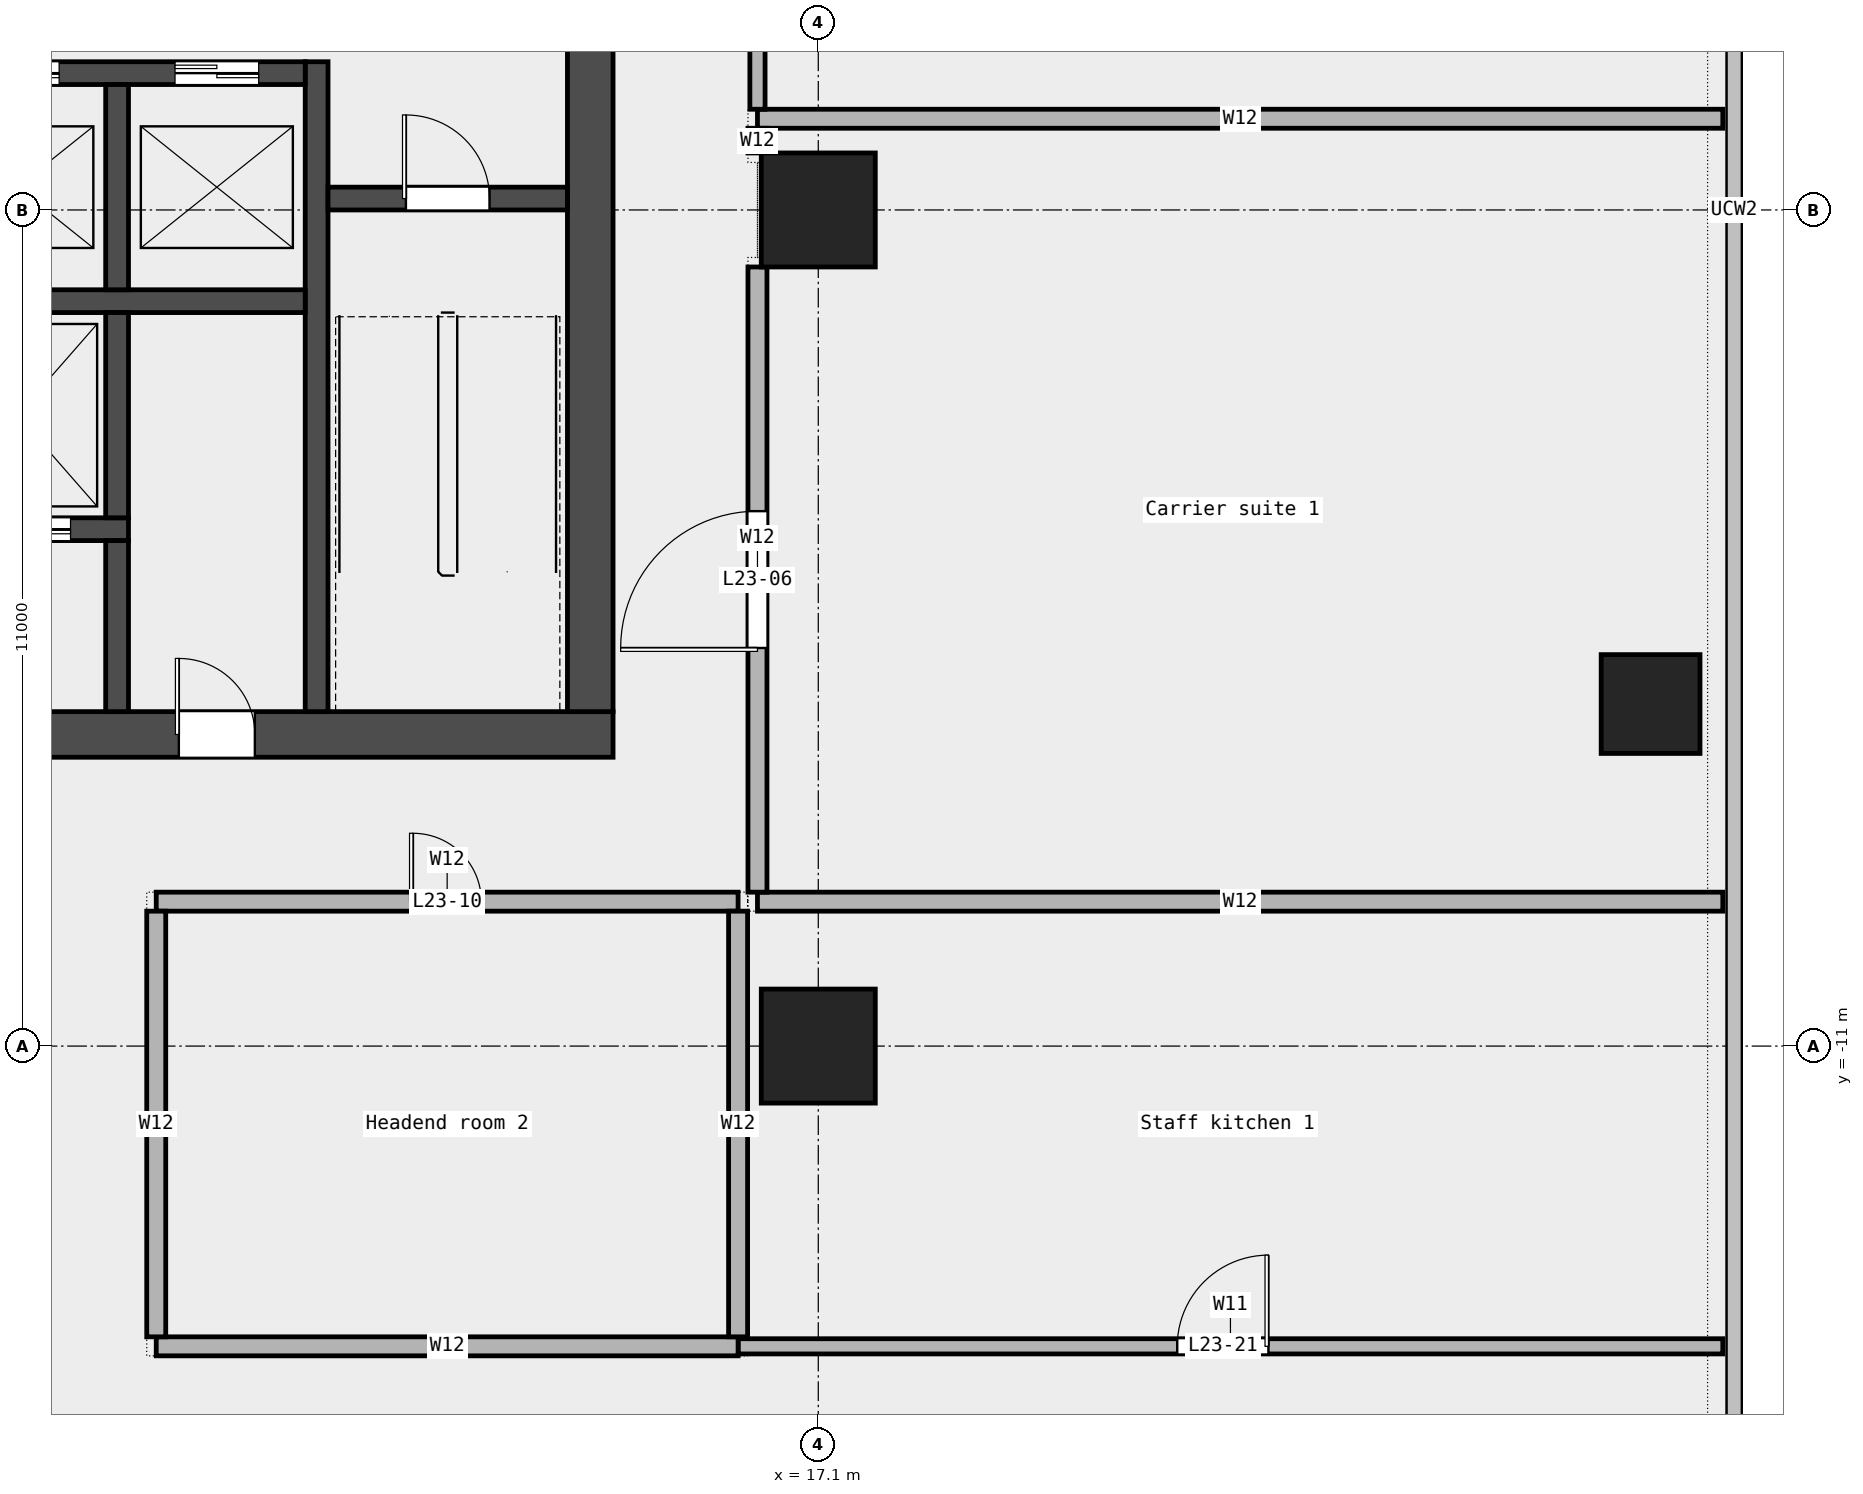
"""IFC4 building model, lengths in metres.
Left out: names, types, materials, properties, quantities, classifications, styles, units other than length and angle.
Written with IfcOpenShell. Run it as: python <this file> out.ifc"""

import sys

from ifc_helpers import new_model, si_unit, direction, frame, frame_2d, origin, origin_2d, place, context, subcontext, project, spatial, rectangle, extrude, element, fill, save


model = new_model("IFC4")
c1 = context("Model", 3, precision=1e-05, world=origin(), true_north=direction((0.0, 1.0)))
c2 = subcontext(c1, "Body", "Model", "MODEL_VIEW")
j1 = project(units=[si_unit("LENGTHUNIT", "METRE"), si_unit("PLANEANGLEUNIT", "RADIAN")], contexts=[c1])
p1 = place(None, origin())
s1 = spatial("IfcSite", under=j1, at=p1, CompositionType="ELEMENT")
p2 = place(p1, origin())
s2 = spatial("IfcBuilding", under=s1, at=p2, CompositionType="ELEMENT")
p3 = place(p2, frame((0.0, 0.0, 117.1)))
s3 = spatial("IfcBuildingStorey", under=s2, at=p3, CompositionType="ELEMENT", Elevation=117.1)
p4 = place(p3, frame((28.05, -6.5, 0.0), z_axis=(0.0, 0.0, 1.0), x_axis=(1.0, 0.0, 0.0)))
e1 = element("IfcColumn", 1, at=p4, inside=s3, PredefinedType="COLUMN", context=c2, shape_type="SweptSolid", body=[
    extrude(rectangle(XDim=1.3, YDim=1.3, at=origin_2d()), origin(), (0.0, 0.0, 1.0), 4.05),
])
for number, where, z_axis, x_axis in (
    (2, (17.1, -11.0, 0.0), (0.0, 0.0, 1.0), (1.0, 0.0, 0.0)),
    (3, (17.1, 0.0, 0.0), (0.0, 0.0, 1.0), (1.0, 0.0, 0.0)),
):
    element("IfcColumn", number, at=place(p3, frame(where, z_axis=z_axis, x_axis=x_axis)), inside=s3, PredefinedType="COLUMN", context=c2, shape_type="SweptSolid", body=[
        extrude(rectangle(XDim=1.5, YDim=1.5, at=origin_2d()), origin(), (0.0, 0.0, 1.0), 4.05),
    ])
p5 = place(p3, frame((16.045, -14.95, 0.0), z_axis=(0.0, 0.0, 1.0), x_axis=(1.0, 0.0, 0.0)))
e4 = element("IfcWall", 4, at=p5, inside=s3, PredefinedType="PARTITIONING", context=c2, shape_type="SweptSolid", body=[
    extrude(rectangle(XDim=12.955, YDim=0.2, at=frame_2d((6.478, 0.0))), origin(), (0.0, 0.0, 1.0), 4.05),
])
p6 = place(p5, frame((5.778, 0.0, 0.0)))
e5 = element("IfcOpeningElement", 5, at=p6, cuts=e4, PredefinedType="OPENING", context=c2, shape_type="SweptSolid", body=[
    extrude(rectangle(XDim=1.2, YDim=2.1, at=frame_2d((0.6, 1.05))), frame((0.0, 0.112, 0.0), z_axis=(0.0, -1.0, 0.0), x_axis=(1.0, 0.0, 0.0)), (0.0, 0.0, 1.0), 0.224),
])
p7 = place(p3, frame((8.39, -14.95, 0.0), z_axis=(0.0, 0.0, 1.0), x_axis=(1.0, 0.0, 0.0)))
e6 = element("IfcWall", 6, at=p7, inside=s3, PredefinedType="PARTITIONING", context=c2, shape_type="SweptSolid", body=[
    extrude(rectangle(XDim=7.655, YDim=0.25, at=frame_2d((3.828, 0.0))), origin(), (0.0, 0.0, 1.0), 4.05),
])
p8 = place(p3, frame((8.39, -9.1, 0.0), z_axis=(0.0, 0.0, 1.0), x_axis=(1.0, 0.0, 0.0)))
e7 = element("IfcWall", 7, at=p8, inside=s3, PredefinedType="PARTITIONING", context=c2, shape_type="SweptSolid", body=[
    extrude(rectangle(XDim=7.655, YDim=0.25, at=frame_2d((3.828, 0.0))), origin(), (0.0, 0.0, 1.0), 4.05),
])
p9 = place(p8, frame((3.377, 0.0, 0.0)))
e8 = element("IfcOpeningElement", 8, at=p9, cuts=e7, PredefinedType="OPENING", context=c2, shape_type="SweptSolid", body=[
    extrude(rectangle(XDim=0.9, YDim=2.1, at=frame_2d((0.45, 1.05))), frame((0.0, 0.137, 0.0), z_axis=(0.0, -1.0, 0.0), x_axis=(1.0, 0.0, 0.0)), (0.0, 0.0, 1.0), 0.274),
])
for number, where, z_axis, x_axis in (
    (9, (16.3, -9.1, 0.0), (0.0, 0.0, 1.0), (1.0, 0.0, 0.0)),
    (10, (16.3, 1.2, 0.0), (0.0, 0.0, 1.0), (1.0, 0.0, 0.0)),
):
    element("IfcWall", number, at=place(p3, frame(where, z_axis=z_axis, x_axis=x_axis)), inside=s3, PredefinedType="PARTITIONING", context=c2, shape_type="SweptSolid", body=[
        extrude(rectangle(XDim=12.7, YDim=0.25, at=frame_2d((6.35, 0.0))), origin(), (0.0, 0.0, 1.0), 4.05),
    ])
for number, where, z_axis, x_axis in (
    (11, (8.39, -14.825, 0.0), (0.0, 0.0, 1.0), (0.0, 1.0, 0.0)),
    (12, (16.045, -14.825, 0.0), (0.0, 0.0, 1.0), (0.0, 1.0, 0.0)),
):
    element("IfcWall", number, at=place(p3, frame(where, z_axis=z_axis, x_axis=x_axis)), inside=s3, PredefinedType="PARTITIONING", context=c2, shape_type="SweptSolid", body=[
        extrude(rectangle(XDim=5.6, YDim=0.25, at=frame_2d((2.8, 0.0))), origin(), (0.0, 0.0, 1.0), 4.05),
    ])
p10 = place(p3, frame((16.3, 1.325, 0.0), z_axis=(0.0, 0.0, 1.0), x_axis=(0.0, 1.0, 0.0)))
e13 = element("IfcWall", 13, at=p10, inside=s3, PredefinedType="PARTITIONING", context=c2, shape_type="SweptSolid", body=[
    extrude(rectangle(XDim=8.925, YDim=0.2, at=frame_2d((4.462, 0.0))), origin(), (0.0, 0.0, 1.0), 4.05),
])
p11 = place(p10, frame((3.188, 0.0, 0.0)))
e14 = element("IfcOpeningElement", 14, at=p11, cuts=e13, PredefinedType="OPENING", context=c2, shape_type="SweptSolid", body=[
    extrude(rectangle(XDim=1.8, YDim=2.1, at=frame_2d((0.9, 1.05))), frame((0.0, 0.112, 0.0), z_axis=(0.0, -1.0, 0.0), x_axis=(1.0, 0.0, 0.0)), (0.0, 0.0, 1.0), 0.224),
])
p12 = place(p3, frame((16.3, -8.975, 0.0), z_axis=(0.0, 0.0, 1.0), x_axis=(0.0, 1.0, 0.0)))
e15 = element("IfcWall", 15, at=p12, inside=s3, PredefinedType="PARTITIONING", context=c2, shape_type="SweptSolid", body=[
    extrude(rectangle(XDim=8.225, YDim=0.25, at=frame_2d((4.113, 0.0))), origin(), (0.0, 0.0, 1.0), 4.05),
])
p13 = place(p12, frame((3.212, 0.0, 0.0)))
e16 = element("IfcOpeningElement", 16, at=p13, cuts=e15, PredefinedType="OPENING", context=c2, shape_type="SweptSolid", body=[
    extrude(rectangle(XDim=1.8, YDim=2.1, at=frame_2d((0.9, 1.05))), frame((0.0, 0.137, 0.0), z_axis=(0.0, -1.0, 0.0), x_axis=(1.0, 0.0, 0.0)), (0.0, 0.0, 1.0), 0.274),
])
p14 = place(p3, frame((16.3, 0.75, 0.0), z_axis=(0.0, 0.0, 1.0), x_axis=(0.0, 1.0, 0.0)))
e17 = element("IfcWall", 17, at=p14, inside=s3, PredefinedType="PARTITIONING", context=c2, shape_type="SweptSolid", body=[
    extrude(rectangle(XDim=0.325, YDim=0.25, at=frame_2d((0.163, 0.0))), origin(), (0.0, 0.0, 1.0), 4.05),
])
p15 = place(p3, frame((-14.4, -6.9, 0.0), z_axis=(0.0, 0.0, 1.0), x_axis=(1.0, 0.0, 0.0)))
e18 = element("IfcWall", 18, at=p15, inside=s3, PredefinedType="SHEAR", context=c2, shape_type="SweptSolid", body=[
    extrude(rectangle(XDim=28.8, YDim=0.6, at=frame_2d((14.4, 0.0))), origin(), (0.0, 0.0, 1.0), 4.2),
])
p16 = place(p15, frame((7.05, 0.0, 0.0)))
e19 = element("IfcOpeningElement", 19, at=p16, cuts=e18, PredefinedType="OPENING", context=c2, shape_type="SweptSolid", body=[
    extrude(rectangle(XDim=1.2, YDim=2.1, at=frame_2d((0.6, 1.05))), frame((0.0, 0.312, 0.0), z_axis=(0.0, -1.0, 0.0), x_axis=(1.0, 0.0, 0.0)), (0.0, 0.0, 1.0), 0.624),
])
p17 = place(p15, frame((11.837, 0.0, 0.0)))
e20 = element("IfcOpeningElement", 20, at=p17, cuts=e18, PredefinedType="OPENING", context=c2, shape_type="SweptSolid", body=[
    extrude(rectangle(XDim=1.0, YDim=2.1, at=frame_2d((0.5, 1.05))), frame((0.0, 0.312, 0.0), z_axis=(0.0, -1.0, 0.0), x_axis=(1.0, 0.0, 0.0)), (0.0, 0.0, 1.0), 0.624),
])
p18 = place(p15, frame((13.712, 0.0, 0.0)))
e21 = element("IfcOpeningElement", 21, at=p18, cuts=e18, PredefinedType="OPENING", context=c2, shape_type="SweptSolid", body=[
    extrude(rectangle(XDim=1.0, YDim=2.1, at=frame_2d((0.5, 1.05))), frame((0.0, 0.312, 0.0), z_axis=(0.0, -1.0, 0.0), x_axis=(1.0, 0.0, 0.0)), (0.0, 0.0, 1.0), 0.624),
])
p19 = place(p15, frame((15.587, 0.0, 0.0)))
e22 = element("IfcOpeningElement", 22, at=p19, cuts=e18, PredefinedType="OPENING", context=c2, shape_type="SweptSolid", body=[
    extrude(rectangle(XDim=1.0, YDim=2.1, at=frame_2d((0.5, 1.05))), frame((0.0, 0.312, 0.0), z_axis=(0.0, -1.0, 0.0), x_axis=(1.0, 0.0, 0.0)), (0.0, 0.0, 1.0), 0.624),
])
p20 = place(p15, frame((18.75, 0.0, 0.0)))
e23 = element("IfcOpeningElement", 23, at=p20, cuts=e18, PredefinedType="OPENING", context=c2, shape_type="SweptSolid", body=[
    extrude(rectangle(XDim=1.8, YDim=2.1, at=frame_2d((0.9, 1.05))), frame((0.0, 0.312, 0.0), z_axis=(0.0, -1.0, 0.0), x_axis=(1.0, 0.0, 0.0)), (0.0, 0.0, 1.0), 0.624),
])
p21 = place(p15, frame((23.087, 0.0, 0.0)))
e24 = element("IfcOpeningElement", 24, at=p21, cuts=e18, PredefinedType="OPENING", context=c2, shape_type="SweptSolid", body=[
    extrude(rectangle(XDim=1.0, YDim=2.1, at=frame_2d((0.5, 1.05))), frame((0.0, 0.312, 0.0), z_axis=(0.0, -1.0, 0.0), x_axis=(1.0, 0.0, 0.0)), (0.0, 0.0, 1.0), 0.624),
])
p22 = place(p3, frame((14.1, -6.6, 0.0), z_axis=(0.0, 0.0, 1.0), x_axis=(0.0, 1.0, 0.0)))
e25 = element("IfcWall", 25, at=p22, inside=s3, PredefinedType="SHEAR", context=c2, shape_type="SweptSolid", body=[
    extrude(rectangle(XDim=19.5, YDim=0.6, at=frame_2d((9.75, 0.0))), origin(), (0.0, 0.0, 1.0), 4.2),
])
p23 = place(p22, frame((9.3, 0.0, 0.0)))
e26 = element("IfcOpeningElement", 26, at=p23, cuts=e25, PredefinedType="OPENING", context=c2, shape_type="SweptSolid", body=[
    extrude(rectangle(XDim=1.8, YDim=2.1, at=frame_2d((0.9, 1.05))), frame((0.0, 0.312, 0.0), z_axis=(0.0, -1.0, 0.0), x_axis=(1.0, 0.0, 0.0)), (0.0, 0.0, 1.0), 0.624),
])
p24 = place(p3, frame((10.5, -6.6, 0.0), z_axis=(0.0, 0.0, 1.0), x_axis=(0.0, 1.0, 0.0)))
e27 = element("IfcWall", 27, at=p24, inside=s3, PredefinedType="SHEAR", context=c2, shape_type="SweptSolid", body=[
    extrude(rectangle(XDim=8.55, YDim=0.3, at=frame_2d((4.275, 0.0))), origin(), (0.0, 0.0, 1.0), 4.2),
])
p25 = place(p3, frame((10.65, 0.15, 0.0), z_axis=(0.0, 0.0, 1.0), x_axis=(1.0, 0.0, 0.0)))
e28 = element("IfcWall", 28, at=p25, inside=s3, PredefinedType="SOLIDWALL", context=c2, shape_type="SweptSolid", body=[
    extrude(rectangle(XDim=3.15, YDim=0.3, at=frame_2d((1.575, 0.0))), origin(), (0.0, 0.0, 1.0), 4.2),
])
p26 = place(p25, frame((1.025, 0.0, 0.0)))
e29 = element("IfcOpeningElement", 29, at=p26, cuts=e28, PredefinedType="OPENING", context=c2, shape_type="SweptSolid", body=[
    extrude(rectangle(XDim=1.1, YDim=2.1, at=frame_2d((0.55, 1.05))), frame((0.0, 0.162, 0.0), z_axis=(0.0, -1.0, 0.0), x_axis=(1.0, 0.0, 0.0)), (0.0, 0.0, 1.0), 0.324),
])
p27 = place(p3, frame((-10.35, -1.2, 0.0), z_axis=(0.0, 0.0, 1.0), x_axis=(1.0, 0.0, 0.0)))
e30 = element("IfcWall", 30, at=p27, inside=s3, PredefinedType="SOLIDWALL", context=c2, shape_type="SweptSolid", body=[
    extrude(rectangle(XDim=20.7, YDim=0.3, at=frame_2d((10.35, 0.0))), origin(), (0.0, 0.0, 1.0), 4.2),
])
p28 = place(p3, frame((-10.35, 1.8, 0.0), z_axis=(0.0, 0.0, 1.0), x_axis=(1.0, 0.0, 0.0)))
e31 = element("IfcWall", 31, at=p28, inside=s3, PredefinedType="SOLIDWALL", context=c2, shape_type="SweptSolid", body=[
    extrude(rectangle(XDim=20.7, YDim=0.3, at=frame_2d((10.35, 0.0))), origin(), (0.0, 0.0, 1.0), 4.2),
])
p29 = place(p28, frame((0.512, 0.0, 0.0)))
e32 = element("IfcOpeningElement", 32, at=p29, cuts=e31, PredefinedType="OPENING", context=c2, shape_type="SweptSolid", body=[
    extrude(rectangle(XDim=1.3, YDim=2.1, at=frame_2d((0.65, 1.05))), frame((0.0, 0.162, 0.0), z_axis=(0.0, -1.0, 0.0), x_axis=(1.0, 0.0, 0.0)), (0.0, 0.0, 1.0), 0.324),
])
p30 = place(p28, frame((5.863, 0.0, 0.0)))
e33 = element("IfcOpeningElement", 33, at=p30, cuts=e31, PredefinedType="OPENING", context=c2, shape_type="SweptSolid", body=[
    extrude(rectangle(XDim=1.1, YDim=2.1, at=frame_2d((0.55, 1.05))), frame((0.0, 0.162, 0.0), z_axis=(0.0, -1.0, 0.0), x_axis=(1.0, 0.0, 0.0)), (0.0, 0.0, 1.0), 0.324),
])
p31 = place(p28, frame((8.488, 0.0, 0.0)))
e34 = element("IfcOpeningElement", 34, at=p31, cuts=e31, PredefinedType="OPENING", context=c2, shape_type="SweptSolid", body=[
    extrude(rectangle(XDim=1.1, YDim=2.1, at=frame_2d((0.55, 1.05))), frame((0.0, 0.162, 0.0), z_axis=(0.0, -1.0, 0.0), x_axis=(1.0, 0.0, 0.0)), (0.0, 0.0, 1.0), 0.324),
])
p32 = place(p28, frame((11.113, 0.0, 0.0)))
e35 = element("IfcOpeningElement", 35, at=p32, cuts=e31, PredefinedType="OPENING", context=c2, shape_type="SweptSolid", body=[
    extrude(rectangle(XDim=1.1, YDim=2.1, at=frame_2d((0.55, 1.05))), frame((0.0, 0.162, 0.0), z_axis=(0.0, -1.0, 0.0), x_axis=(1.0, 0.0, 0.0)), (0.0, 0.0, 1.0), 0.324),
])
p33 = place(p28, frame((13.738, 0.0, 0.0)))
e36 = element("IfcOpeningElement", 36, at=p33, cuts=e31, PredefinedType="OPENING", context=c2, shape_type="SweptSolid", body=[
    extrude(rectangle(XDim=1.1, YDim=2.1, at=frame_2d((0.55, 1.05))), frame((0.0, 0.162, 0.0), z_axis=(0.0, -1.0, 0.0), x_axis=(1.0, 0.0, 0.0)), (0.0, 0.0, 1.0), 0.324),
])
p34 = place(p28, frame((16.363, 0.0, 0.0)))
e37 = element("IfcOpeningElement", 37, at=p34, cuts=e31, PredefinedType="OPENING", context=c2, shape_type="SweptSolid", body=[
    extrude(rectangle(XDim=1.1, YDim=2.1, at=frame_2d((0.55, 1.05))), frame((0.0, 0.162, 0.0), z_axis=(0.0, -1.0, 0.0), x_axis=(1.0, 0.0, 0.0)), (0.0, 0.0, 1.0), 0.324),
])
p35 = place(p28, frame((18.988, 0.0, 0.0)))
e38 = element("IfcOpeningElement", 38, at=p35, cuts=e31, PredefinedType="OPENING", context=c2, shape_type="SweptSolid", body=[
    extrude(rectangle(XDim=1.1, YDim=2.1, at=frame_2d((0.55, 1.05))), frame((0.0, 0.162, 0.0), z_axis=(0.0, -1.0, 0.0), x_axis=(1.0, 0.0, 0.0)), (0.0, 0.0, 1.0), 0.324),
])
p36 = place(p3, frame((7.875, -1.05, 0.0), z_axis=(0.0, 0.0, 1.0), x_axis=(0.0, 1.0, 0.0)))
e39 = element("IfcWall", 39, at=p36, inside=s3, PredefinedType="SOLIDWALL", context=c2, shape_type="SweptSolid", body=[
    extrude(rectangle(XDim=2.7, YDim=0.3, at=frame_2d((1.35, 0.0))), origin(), (0.0, 0.0, 1.0), 4.2),
])
p37 = place(p3, frame((2.475, -4.2, 0.0), z_axis=(0.0, 0.0, 1.0), x_axis=(1.0, 0.0, 0.0)))
e40 = element("IfcWall", 40, at=p37, inside=s3, PredefinedType="SOLIDWALL", context=c2, shape_type="SweptSolid", body=[
    extrude(rectangle(XDim=5.55, YDim=0.3, at=frame_2d((2.775, 0.0))), origin(), (0.0, 0.0, 1.0), 4.2),
])
p38 = place(p37, frame((0.762, 0.0, 0.0)))
e41 = element("IfcOpeningElement", 41, at=p38, cuts=e40, PredefinedType="OPENING", context=c2, shape_type="SweptSolid", body=[
    extrude(rectangle(XDim=1.4, YDim=2.1, at=frame_2d((0.7, 1.05))), frame((0.0, 0.162, 0.0), z_axis=(0.0, -1.0, 0.0), x_axis=(1.0, 0.0, 0.0)), (0.0, 0.0, 1.0), 0.324),
])
p39 = place(p37, frame((3.387, 0.0, 0.0)))
e42 = element("IfcOpeningElement", 42, at=p39, cuts=e40, PredefinedType="OPENING", context=c2, shape_type="SweptSolid", body=[
    extrude(rectangle(XDim=1.4, YDim=2.1, at=frame_2d((0.7, 1.05))), frame((0.0, 0.162, 0.0), z_axis=(0.0, -1.0, 0.0), x_axis=(1.0, 0.0, 0.0)), (0.0, 0.0, 1.0), 0.324),
])
p40 = place(p3, frame((7.875, -4.05, 0.0), z_axis=(0.0, 0.0, 1.0), x_axis=(0.0, 1.0, 0.0)))
e43 = element("IfcWall", 43, at=p40, inside=s3, PredefinedType="SOLIDWALL", context=c2, shape_type="SweptSolid", body=[
    extrude(rectangle(XDim=2.7, YDim=0.3, at=frame_2d((1.35, 0.0))), origin(), (0.0, 0.0, 1.0), 4.2),
])
p41 = place(p3, frame((7.875, -6.6, 0.0), z_axis=(0.0, 0.0, 1.0), x_axis=(0.0, 1.0, 0.0)))
e44 = element("IfcWall", 44, at=p41, inside=s3, PredefinedType="SOLIDWALL", context=c2, shape_type="SweptSolid", body=[
    extrude(rectangle(XDim=2.25, YDim=0.3, at=frame_2d((1.125, 0.0))), origin(), (0.0, 0.0, 1.0), 4.2),
])
p42 = place(p13, origin())
e45 = element("IfcDoor", 45, at=p42, inside=s3, OperationType="DOUBLE_DOOR_SINGLE_SWING", PredefinedType="DOOR", context=c2, shape_type="SweptSolid", body=[
    extrude(rectangle(XDim=1.8, YDim=2.1, at=frame_2d((0.9, 1.05))), frame((0.0, 0.025, 0.0), z_axis=(0.0, -1.0, 0.0), x_axis=(1.0, 0.0, 0.0)), (0.0, 0.0, 1.0), 0.05),
])
fill(e16, e45)
p43 = place(p9, origin())
e46 = element("IfcDoor", 46, at=p43, inside=s3, OperationType="SINGLE_SWING_LEFT", PredefinedType="DOOR", context=c2, shape_type="SweptSolid", body=[
    extrude(rectangle(XDim=0.9, YDim=2.1, at=frame_2d((0.45, 1.05))), frame((0.0, 0.025, 0.0), z_axis=(0.0, -1.0, 0.0), x_axis=(1.0, 0.0, 0.0)), (0.0, 0.0, 1.0), 0.05),
])
fill(e8, e46)
p44 = place(p6, origin())
e47 = element("IfcDoor", 47, at=p44, inside=s3, OperationType="SINGLE_SWING_RIGHT", PredefinedType="DOOR", context=c2, shape_type="SweptSolid", body=[
    extrude(rectangle(XDim=1.2, YDim=2.1, at=frame_2d((0.6, 1.05))), frame((0.0, 0.025, 0.0), z_axis=(0.0, -1.0, 0.0), x_axis=(1.0, 0.0, 0.0)), (0.0, 0.0, 1.0), 0.05),
])
fill(e5, e47)
p45 = place(p26, origin())
e48 = element("IfcDoor", 48, at=p45, inside=s3, OperationType="SINGLE_SWING_RIGHT", PredefinedType="DOOR", context=c2, shape_type="SweptSolid", body=[
    extrude(rectangle(XDim=1.1, YDim=2.1, at=frame_2d((0.55, 1.05))), frame((0.0, 0.025, 0.0), z_axis=(0.0, -1.0, 0.0), x_axis=(1.0, 0.0, 0.0)), (0.0, 0.0, 1.0), 0.05),
])
fill(e29, e48)
p46 = place(p34, origin())
e49 = element("IfcDoor", 49, at=p46, inside=s3, OperationType="DOUBLE_DOOR_SLIDING", PredefinedType="DOOR", context=c2, shape_type="SweptSolid", body=[
    extrude(rectangle(XDim=1.1, YDim=2.1, at=frame_2d((0.55, 1.05))), frame((0.0, 0.025, 0.0), z_axis=(0.0, -1.0, 0.0), x_axis=(1.0, 0.0, 0.0)), (0.0, 0.0, 1.0), 0.05),
])
fill(e37, e49)
p47 = place(p35, origin())
e50 = element("IfcDoor", 50, at=p47, inside=s3, OperationType="DOUBLE_DOOR_SLIDING", PredefinedType="DOOR", context=c2, shape_type="SweptSolid", body=[
    extrude(rectangle(XDim=1.1, YDim=2.1, at=frame_2d((0.55, 1.05))), frame((0.0, 0.025, 0.0), z_axis=(0.0, -1.0, 0.0), x_axis=(1.0, 0.0, 0.0)), (0.0, 0.0, 1.0), 0.05),
])
fill(e38, e50)
p48 = place(p39, origin())
e51 = element("IfcDoor", 51, at=p48, inside=s3, OperationType="DOUBLE_DOOR_SLIDING", PredefinedType="DOOR", context=c2, shape_type="SweptSolid", body=[
    extrude(rectangle(XDim=1.4, YDim=2.1, at=frame_2d((0.7, 1.05))), frame((0.0, 0.025, 0.0), z_axis=(0.0, -1.0, 0.0), x_axis=(1.0, 0.0, 0.0)), (0.0, 0.0, 1.0), 0.05),
])
fill(e42, e51)
p49 = place(p21, origin())
e52 = element("IfcDoor", 52, at=p49, inside=s3, OperationType="SINGLE_SWING_LEFT", PredefinedType="DOOR", context=c2, shape_type="SweptSolid", body=[
    extrude(rectangle(XDim=1.0, YDim=2.1, at=frame_2d((0.5, 1.05))), frame((0.0, 0.025, 0.0), z_axis=(0.0, -1.0, 0.0), x_axis=(1.0, 0.0, 0.0)), (0.0, 0.0, 1.0), 0.05),
])
fill(e24, e52)
save(model, sys.argv[1])
